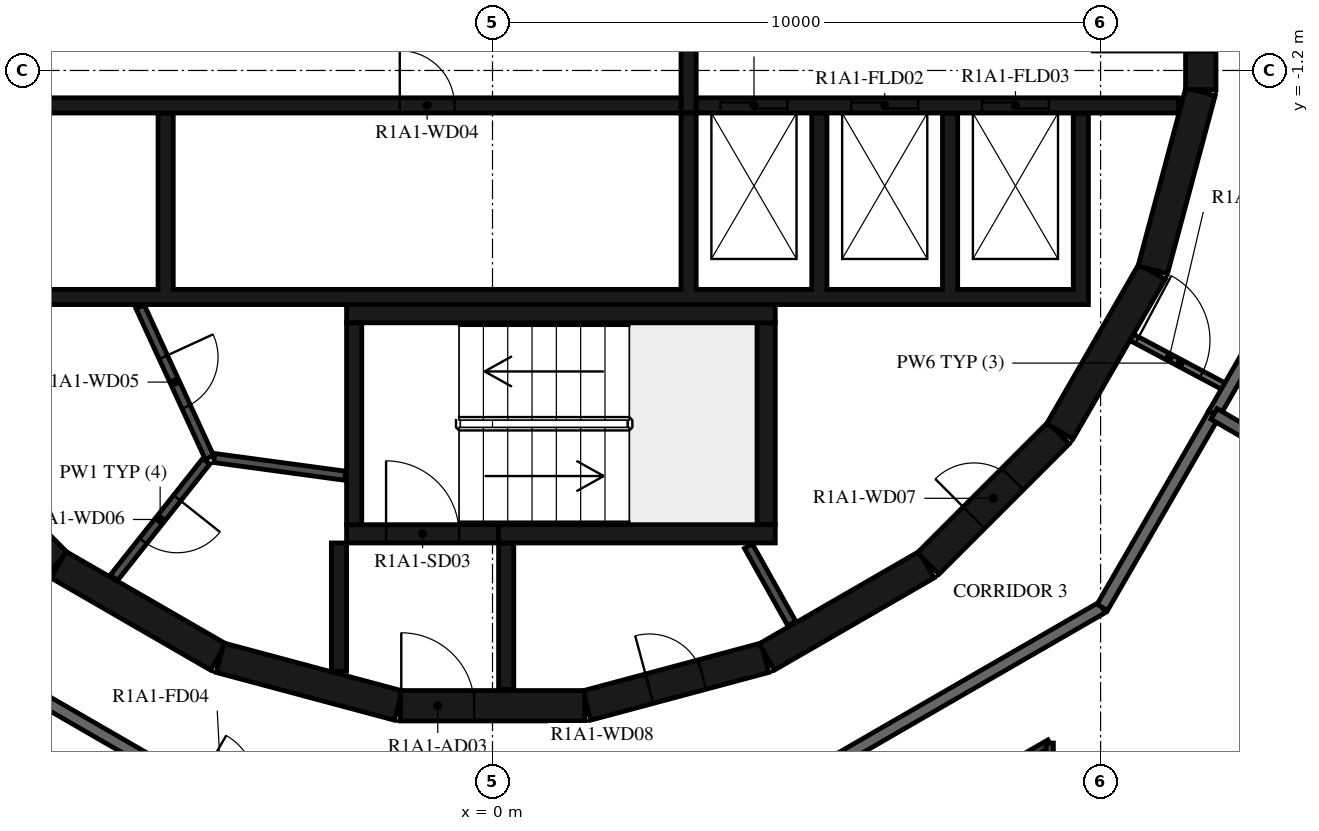
"""IFC4 building model, lengths in metres.
Left out: names, types, materials, properties, quantities, classifications, styles, units other than length and angle.
Written with IfcOpenShell. Run it as: python <this file> out.ifc"""

import sys

from ifc_helpers import new_model, si_unit, direction, frame, frame_2d, origin, place, context, subcontext, project, spatial, polyline, rectangle, outline, extrude, element, fill, save


model = new_model("IFC4")
c1 = context("Model", 3, precision=1e-05, world=origin(), true_north=direction((0.0, 1.0)))
c2 = subcontext(c1, "Body", "Model", "MODEL_VIEW")
j1 = project(units=[si_unit("LENGTHUNIT", "METRE"), si_unit("PLANEANGLEUNIT", "RADIAN")], contexts=[c1])
p1 = place(None, origin())
s1 = spatial("IfcSite", under=j1, at=p1, CompositionType="ELEMENT")
p2 = place(p1, origin())
s2 = spatial("IfcBuilding", under=s1, at=p2, CompositionType="ELEMENT")
p3 = place(p2, frame((0.0, 0.0, 41.9)))
s3 = spatial("IfcBuildingStorey", under=s2, at=p3, CompositionType="ELEMENT", Elevation=41.9)
p4 = place(p3, frame((1.55, -11.643, 0.0), z_axis=(0.0, 0.0, 1.0), x_axis=(0.965948410781, 0.258734743916, 0.0)))
e1 = element("IfcWall", 1, at=p4, inside=s3, PredefinedType="SHEAR", context=c2, shape_type="SweptSolid", body=[
    extrude(rectangle(XDim=3.033, YDim=0.5, at=frame_2d((1.516, 0.0))), origin(), (0.0, 0.0, 1.0), 3.12),
])
p5 = place(p4, frame((1.066, 0.0, 0.0)))
e2 = element("IfcOpeningElement", 2, at=p5, cuts=e1, PredefinedType="OPENING", context=c2, shape_type="SweptSolid", body=[
    extrude(rectangle(XDim=0.9, YDim=2.1, at=frame_2d((0.45, 1.05))), frame((0.0, 0.26, 0.0), z_axis=(0.0, -1.0, 0.0), x_axis=(1.0, 0.0, 0.0)), (0.0, 0.0, 1.0), 0.52),
])
p6 = place(p3, frame((4.51, -10.845, 0.0), z_axis=(0.0, 0.0, 1.0), x_axis=(0.865975092491, 0.500087131594, 0.0)))
e3 = element("IfcWall", 3, at=p6, inside=s3, PredefinedType="SHEAR", context=c2, shape_type="SweptSolid", body=[
    extrude(rectangle(XDim=3.033, YDim=0.5, at=frame_2d((1.516, 0.0))), origin(), (0.0, 0.0, 1.0), 3.12),
])
p7 = place(p3, frame((7.164, -9.308, 0.0), z_axis=(0.0, 0.0, 1.0), x_axis=(0.707106781187, 0.707106781187, 0.0)))
e4 = element("IfcWall", 4, at=p7, inside=s3, PredefinedType="SHEAR", context=c2, shape_type="SweptSolid", body=[
    extrude(rectangle(XDim=3.032, YDim=0.5, at=frame_2d((1.516, 0.0))), origin(), (0.0, 0.0, 1.0), 3.12),
])
p8 = place(p7, frame((1.066, 0.0, 0.0)))
e5 = element("IfcOpeningElement", 5, at=p8, cuts=e4, PredefinedType="OPENING", context=c2, shape_type="SweptSolid", body=[
    extrude(rectangle(XDim=0.9, YDim=2.1, at=frame_2d((0.45, 1.05))), frame((0.0, 0.26, 0.0), z_axis=(0.0, -1.0, 0.0), x_axis=(1.0, 0.0, 0.0)), (0.0, 0.0, 1.0), 0.52),
])
for number, where, z_axis, x_axis in (
    (6, (9.329, -7.137, 0.0), (0.0, 0.0, 1.0), (0.5, 0.866, 0.0)),
    (7, (10.858, -4.479, 0.0), (0.0, 0.0, 1.0), (0.259, 0.966, 0.0)),
):
    element("IfcWall", number, at=place(p3, frame(where, z_axis=z_axis, x_axis=x_axis)), inside=s3, PredefinedType="SHEAR", context=c2, shape_type="SweptSolid", body=[
        extrude(rectangle(XDim=3.033, YDim=0.5, at=frame_2d((1.516, 0.0))), origin(), (0.0, 0.0, 1.0), 3.12),
    ])
p9 = place(p3, frame((11.647, -1.516, 0.0), z_axis=(0.0, 0.0, 1.0), x_axis=(0.0, 1.0, 0.0)))
e8 = element("IfcWall", 8, at=p9, inside=s3, PredefinedType="SHEAR", context=c2, shape_type="SweptSolid", body=[
    extrude(rectangle(XDim=3.033, YDim=0.5, at=frame_2d((1.516, 0.0))), origin(), (0.0, 0.0, 1.0), 3.12),
])
p10 = place(p9, frame((0.616, 0.0, 0.0)))
e9 = element("IfcOpeningElement", 9, at=p10, cuts=e8, PredefinedType="OPENING", context=c2, shape_type="SweptSolid", body=[
    extrude(rectangle(XDim=1.8, YDim=2.1, at=frame_2d((0.9, 1.05))), frame((0.0, 0.26, 0.0), z_axis=(0.0, -1.0, 0.0), x_axis=(1.0, 0.0, 0.0)), (0.0, 0.0, 1.0), 0.52),
])
p11 = place(p3, frame((-9.308, -7.164, 0.0), z_axis=(0.0, 0.0, 1.0), x_axis=(0.707106781187, -0.707106781187, 0.0)))
e10 = element("IfcWall", 10, at=p11, inside=s3, PredefinedType="SHEAR", context=c2, shape_type="SweptSolid", body=[
    extrude(rectangle(XDim=3.032, YDim=0.5, at=frame_2d((1.516, 0.0))), origin(), (0.0, 0.0, 1.0), 3.12),
])
for number, where, z_axis, x_axis in (
    (11, (-7.137, -9.329, 0.0), (0.0, 0.0, 1.0), (0.866, -0.5, 0.0)),
    (12, (-4.479, -10.858, 0.0), (0.0, 0.0, 1.0), (0.966, -0.259, 0.0)),
):
    element("IfcWall", number, at=place(p3, frame(where, z_axis=z_axis, x_axis=x_axis)), inside=s3, PredefinedType="SHEAR", context=c2, shape_type="SweptSolid", body=[
        extrude(rectangle(XDim=3.033, YDim=0.5, at=frame_2d((1.516, 0.0))), origin(), (0.0, 0.0, 1.0), 3.12),
    ])
p12 = place(p3, frame((-1.516, -11.647, 0.0), z_axis=(0.0, 0.0, 1.0), x_axis=(1.0, 0.0, 0.0)))
e13 = element("IfcWall", 13, at=p12, inside=s3, PredefinedType="SHEAR", context=c2, shape_type="SweptSolid", body=[
    extrude(rectangle(XDim=3.033, YDim=0.5, at=frame_2d((1.516, 0.0))), origin(), (0.0, 0.0, 1.0), 3.12),
])
p13 = place(p12, frame((0.016, 0.0, 0.0)))
e14 = element("IfcOpeningElement", 14, at=p13, cuts=e13, PredefinedType="OPENING", context=c2, shape_type="SweptSolid", body=[
    extrude(rectangle(XDim=1.2, YDim=2.1, at=frame_2d((0.6, 1.05))), frame((0.0, 0.26, 0.0), z_axis=(0.0, -1.0, 0.0), x_axis=(1.0, 0.0, 0.0)), (0.0, 0.0, 1.0), 0.52),
])
p14 = place(p3, frame((-2.275, -8.67, 0.0), z_axis=(0.0, 0.0, 1.0), x_axis=(0.0, 1.0, 0.0)))
e15 = element("IfcWall", 15, at=p14, inside=s3, PredefinedType="SHEAR", context=c2, shape_type="SweptSolid", body=[
    extrude(rectangle(XDim=3.32, YDim=0.25, at=frame_2d((1.66, 0.0))), origin(), (0.0, 0.0, 1.0), 3.12),
])
p15 = place(p3, frame((-2.4, -5.2, 0.0), z_axis=(0.0, 0.0, 1.0), x_axis=(1.0, 0.0, 0.0)))
e16 = element("IfcWall", 16, at=p15, inside=s3, PredefinedType="SHEAR", context=c2, shape_type="SweptSolid", body=[
    extrude(rectangle(XDim=7.05, YDim=0.3, at=frame_2d((3.525, 0.0))), origin(), (0.0, 0.0, 1.0), 3.12),
])
p16 = place(p3, frame((4.5, -8.67, 0.0), z_axis=(0.0, 0.0, 1.0), x_axis=(0.0, 1.0, 0.0)))
e17 = element("IfcWall", 17, at=p16, inside=s3, PredefinedType="SHEAR", context=c2, shape_type="SweptSolid", body=[
    extrude(rectangle(XDim=3.32, YDim=0.3, at=frame_2d((1.66, 0.0))), origin(), (0.0, 0.0, 1.0), 3.12),
])
p17 = place(p3, frame((0.1, -8.82, 0.0), z_axis=(0.0, 0.0, 1.0), x_axis=(1.0, 0.0, 0.0)))
e18 = element("IfcWall", 18, at=p17, inside=s3, PredefinedType="SHEAR", context=c2, shape_type="SweptSolid", body=[
    extrude(rectangle(XDim=4.55, YDim=0.3, at=frame_2d((2.275, 0.0))), origin(), (0.0, 0.0, 1.0), 3.12),
])
p18 = place(p3, frame((-2.4, -8.82, 0.0), z_axis=(0.0, 0.0, 1.0), x_axis=(1.0, 0.0, 0.0)))
e19 = element("IfcWall", 19, at=p18, inside=s3, PredefinedType="SHEAR", context=c2, shape_type="SweptSolid", body=[
    extrude(rectangle(XDim=2.5, YDim=0.3, at=frame_2d((1.25, 0.0))), origin(), (0.0, 0.0, 1.0), 3.12),
])
p19 = place(p18, frame((0.65, 0.0, 0.0)))
e20 = element("IfcOpeningElement", 20, at=p19, cuts=e19, PredefinedType="OPENING", context=c2, shape_type="SweptSolid", body=[
    extrude(rectangle(XDim=1.2, YDim=2.1, at=frame_2d((0.6, 1.05))), frame((0.0, 0.16, 0.0), z_axis=(0.0, -1.0, 0.0), x_axis=(1.0, 0.0, 0.0)), (0.0, 0.0, 1.0), 0.32),
])
p20 = place(p3, frame((-2.525, -8.97, 0.0), z_axis=(0.0, 0.0, 1.0), x_axis=(0.0, -1.0, 0.0)))
e21 = element("IfcWall", 21, at=p20, inside=s3, PredefinedType="SHEAR", context=c2, shape_type="SweptSolid", body=[
    extrude(rectangle(XDim=2.11, YDim=0.25, at=frame_2d((1.055, 0.0))), origin(), (0.0, 0.0, 1.0), 3.12),
])
p21 = place(p3, frame((0.225, -8.97, 0.0), z_axis=(0.0, 0.0, 1.0), x_axis=(0.0, -1.0, 0.0)))
e22 = element("IfcWall", 22, at=p21, inside=s3, PredefinedType="SHEAR", context=c2, shape_type="SweptSolid", body=[
    extrude(rectangle(XDim=2.41, YDim=0.25, at=frame_2d((1.205, 0.0))), origin(), (0.0, 0.0, 1.0), 3.12),
])
p22 = place(p3, origin())
e23 = element("IfcWall", 23, at=p22, inside=s3, PredefinedType="SHEAR", context=c2, shape_type="SweptSolid", body=[
    extrude(outline(polyline([(9.8, -5.05), (9.8, -4.8), (9.8, -1.9), (9.55, -1.9), (9.55, -4.8), (7.65, -4.8), (7.65, -1.9), (7.4, -1.9), (7.4, -4.8), (5.5, -4.8), (5.5, -1.9), (5.25, -1.9), (5.25, -4.8), (3.35, -4.8), (3.35, -1.9), (3.1, -1.9), (3.1, -4.8), (-5.25, -4.8), (-5.25, -1.9), (-5.5, -1.9), (-5.5, -4.8), (-7.4, -4.8), (-7.4, -1.9), (-7.65, -1.9), (-7.65, -4.8), (-9.55, -4.8), (-9.55, -1.9), (-9.8, -1.9), (-9.8, -4.8), (-9.8, -5.05), (9.8, -5.05)])), origin(), (0.0, 0.0, 1.0), 3.12),
])
p23 = place(p3, frame((-11.28, -1.775, 0.0), z_axis=(0.0, 0.0, 1.0), x_axis=(1.0, 0.0, 0.0)))
e24 = element("IfcWall", 24, at=p23, inside=s3, PredefinedType="SHEAR", context=c2, shape_type="SweptSolid", body=[
    extrude(rectangle(XDim=14.38, YDim=0.25, at=frame_2d((7.19, 0.0))), origin(), (0.0, 0.0, 1.0), 3.12),
])
p24 = place(p23, frame((9.755, 0.0, 0.0)))
e25 = element("IfcOpeningElement", 25, at=p24, cuts=e24, PredefinedType="OPENING", context=c2, shape_type="SweptSolid", body=[
    extrude(rectangle(XDim=0.9, YDim=2.1, at=frame_2d((0.45, 1.05))), frame((0.0, 0.135, 0.0), z_axis=(0.0, -1.0, 0.0), x_axis=(1.0, 0.0, 0.0)), (0.0, 0.0, 1.0), 0.27),
])
p25 = place(p3, frame((3.35, -1.775, 0.0), z_axis=(0.0, 0.0, 1.0), x_axis=(1.0, 0.0, 0.0)))
e26 = element("IfcWall", 26, at=p25, inside=s3, PredefinedType="SHEAR", context=c2, shape_type="SweptSolid", body=[
    extrude(rectangle(XDim=7.93, YDim=0.25, at=frame_2d((3.965, 0.0))), origin(), (0.0, 0.0, 1.0), 3.12),
])
p26 = place(p25, frame((0.4, 0.0, 0.0)))
e27 = element("IfcOpeningElement", 27, at=p26, cuts=e26, PredefinedType="OPENING", context=c2, shape_type="SweptSolid", body=[
    extrude(rectangle(XDim=1.1, YDim=2.4, at=frame_2d((0.55, 1.2))), frame((0.0, 0.135, 0.0), z_axis=(0.0, -1.0, 0.0), x_axis=(1.0, 0.0, 0.0)), (0.0, 0.0, 1.0), 0.27),
])
p27 = place(p25, frame((2.55, 0.0, 0.0)))
e28 = element("IfcOpeningElement", 28, at=p27, cuts=e26, PredefinedType="OPENING", context=c2, shape_type="SweptSolid", body=[
    extrude(rectangle(XDim=1.1, YDim=2.4, at=frame_2d((0.55, 1.2))), frame((0.0, 0.135, 0.0), z_axis=(0.0, -1.0, 0.0), x_axis=(1.0, 0.0, 0.0)), (0.0, 0.0, 1.0), 0.27),
])
p28 = place(p25, frame((4.7, 0.0, 0.0)))
e29 = element("IfcOpeningElement", 29, at=p28, cuts=e26, PredefinedType="OPENING", context=c2, shape_type="SweptSolid", body=[
    extrude(rectangle(XDim=1.1, YDim=2.4, at=frame_2d((0.55, 1.2))), frame((0.0, 0.135, 0.0), z_axis=(0.0, -1.0, 0.0), x_axis=(1.0, 0.0, 0.0)), (0.0, 0.0, 1.0), 0.27),
])
p29 = place(p3, frame((3.225, -1.9, 0.0), z_axis=(0.0, 0.0, 1.0), x_axis=(0.0, 1.0, 0.0)))
e30 = element("IfcWall", 30, at=p29, inside=s3, PredefinedType="SHEAR", context=c2, shape_type="SweptSolid", body=[
    extrude(rectangle(XDim=3.8, YDim=0.25, at=frame_2d((1.9, 0.0))), origin(), (0.0, 0.0, 1.0), 3.12),
])
p30 = place(p3, frame((4.922, -10.296, 0.0), z_axis=(0.0, 0.0, 1.0), x_axis=(-0.48860846254, 0.872503163509, 0.0)))
e31 = element("IfcWall", 31, at=p30, inside=s3, PredefinedType="PARTITIONING", context=c2, shape_type="SweptSolid", body=[
    extrude(rectangle(XDim=1.459, YDim=0.15, at=frame_2d((0.73, 0.0))), origin(), (0.0, 0.0, 1.0), 3.12),
])
p31 = place(p3, frame((-5.795, -5.086, 0.0), z_axis=(0.0, 0.0, 1.0), x_axis=(0.417887867606, -0.908498613157, 0.0)))
e32 = element("IfcWall", 32, at=p31, inside=s3, PredefinedType="PARTITIONING", context=c2, shape_type="SweptSolid", body=[
    extrude(rectangle(XDim=2.726, YDim=0.15, at=frame_2d((1.363, 0.0))), origin(), (0.0, 0.0, 1.0), 3.12),
])
p32 = place(p31, frame((0.913, 0.0, 0.0)))
e33 = element("IfcOpeningElement", 33, at=p32, cuts=e32, PredefinedType="OPENING", context=c2, shape_type="SweptSolid", body=[
    extrude(rectangle(XDim=0.9, YDim=2.1, at=frame_2d((0.45, 1.05))), frame((0.0, 0.085, 0.0), z_axis=(0.0, -1.0, 0.0), x_axis=(1.0, 0.0, 0.0)), (0.0, 0.0, 1.0), 0.17),
])
p33 = place(p3, frame((-4.706, -7.625, 0.0), z_axis=(0.0, 0.0, 1.0), x_axis=(-0.621392599334, -0.783499353856, 0.0)))
e34 = element("IfcWall", 34, at=p33, inside=s3, PredefinedType="PARTITIONING", context=c2, shape_type="SweptSolid", body=[
    extrude(rectangle(XDim=2.447, YDim=0.15, at=frame_2d((1.224, 0.0))), origin(), (0.0, 0.0, 1.0), 3.12),
])
p34 = place(p33, frame((0.774, 0.0, 0.0)))
e35 = element("IfcOpeningElement", 35, at=p34, cuts=e34, PredefinedType="OPENING", context=c2, shape_type="SweptSolid", body=[
    extrude(rectangle(XDim=0.9, YDim=2.1, at=frame_2d((0.45, 1.05))), frame((0.0, 0.085, 0.0), z_axis=(0.0, -1.0, 0.0), x_axis=(1.0, 0.0, 0.0)), (0.0, 0.0, 1.0), 0.17),
])
p35 = place(p3, frame((-2.42, -7.865, 0.0), z_axis=(0.0, 0.0, 1.0), x_axis=(-0.990972299108, 0.134066783362, 0.0)))
e36 = element("IfcWall", 36, at=p35, inside=s3, PredefinedType="PARTITIONING", context=c2, shape_type="SweptSolid", body=[
    extrude(rectangle(XDim=2.176, YDim=0.15, at=frame_2d((1.088, 0.0))), origin(), (0.0, 0.0, 1.0), 3.12),
])
p36 = place(p3, frame((10.511, -5.589, 0.0), z_axis=(0.0, 0.0, 1.0), x_axis=(0.88294043061, -0.469485032769, 0.0)))
e37 = element("IfcWall", 37, at=p36, inside=s3, PredefinedType="PARTITIONING", context=c2, shape_type="SweptSolid", body=[
    extrude(rectangle(XDim=1.804, YDim=0.12, at=frame_2d((0.902, 0.0))), origin(), (0.0, 0.0, 1.0), 3.12),
])
p37 = place(p36, frame((0.1, 0.0, 0.0)))
e38 = element("IfcOpeningElement", 38, at=p37, cuts=e37, PredefinedType="OPENING", context=c2, shape_type="SweptSolid", body=[
    extrude(rectangle(XDim=1.2, YDim=2.1, at=frame_2d((0.6, 1.05))), frame((0.0, 0.07, 0.0), z_axis=(0.0, -1.0, 0.0), x_axis=(1.0, 0.0, 0.0)), (0.0, 0.0, 1.0), 0.14),
])
p38 = place(p3, frame((11.865, -6.849, 0.0), z_axis=(0.0, 0.0, 1.0), x_axis=(0.500002704028, 0.866023842607, 0.0)))
e39 = element("IfcWall", 39, at=p38, inside=s3, PredefinedType="STANDARD", context=c2, shape_type="SweptSolid", body=[
    extrude(rectangle(XDim=3.67, YDim=0.2, at=frame_2d((1.835, 0.0))), origin(), (0.0, 0.0, 1.0), 3.12),
])
p39 = place(p3, frame((-10.029, -10.029, 0.0), z_axis=(0.0, 0.0, 1.0), x_axis=(0.866022878987, -0.500004373052, 0.0)))
e40 = element("IfcWall", 40, at=p39, inside=s3, PredefinedType="STANDARD", context=c2, shape_type="SweptSolid", body=[
    extrude(rectangle(XDim=7.146, YDim=0.2, at=frame_2d((3.573, 0.0))), origin(), (0.0, 0.0, 1.0), 3.12),
])
p40 = place(p39, frame((5.947, 0.0, 0.0)))
e41 = element("IfcOpeningElement", 41, at=p40, cuts=e40, PredefinedType="OPENING", context=c2, shape_type="SweptSolid", body=[
    extrude(rectangle(XDim=1.0, YDim=2.1, at=frame_2d((0.5, 1.05))), frame((0.0, 0.11, 0.0), z_axis=(0.0, -1.0, 0.0), x_axis=(1.0, 0.0, 0.0)), (0.0, 0.0, 1.0), 0.22),
])
p41 = place(p3, frame((3.671, -13.7, 0.0), z_axis=(0.0, 0.0, 1.0), x_axis=(0.866024439905, 0.500001669485, 0.0)))
e42 = element("IfcWall", 42, at=p41, inside=s3, PredefinedType="STANDARD", context=c2, shape_type="SweptSolid", body=[
    extrude(rectangle(XDim=7.342, YDim=0.2, at=frame_2d((3.671, 0.0))), origin(), (0.0, 0.0, 1.0), 3.12),
])
p42 = place(p3, frame((10.029, -10.029, 0.0), z_axis=(0.0, 0.0, 1.0), x_axis=(0.50001606911, 0.866016126081, 0.0)))
e43 = element("IfcWall", 43, at=p42, inside=s3, PredefinedType="STANDARD", context=c2, shape_type="SweptSolid", body=[
    extrude(rectangle(XDim=3.671, YDim=0.2, at=frame_2d((1.835, 0.0))), origin(), (0.0, 0.0, 1.0), 3.12),
])
p43 = place(p3, frame((18.694, -10.793, 0.0), z_axis=(0.0, 0.0, 1.0), x_axis=(-0.865964895271, 0.500104789178, 0.0)))
e44 = element("IfcWall", 44, at=p43, inside=s3, PredefinedType="STANDARD", context=c2, shape_type="SweptSolid", body=[
    extrude(rectangle(XDim=7.885, YDim=0.2, at=frame_2d((3.943, 0.0))), origin(), (0.0, 0.0, 1.0), 3.12),
])
p44 = place(p3, frame((-11.127, -11.127, 0.0), z_axis=(0.0, 0.0, 1.0), x_axis=(0.866032360344, -0.499987950692, 0.0)))
e45 = element("IfcWall", 45, at=p44, inside=s3, PredefinedType="PARTITIONING", context=c2, shape_type="SweptSolid", body=[
    extrude(rectangle(XDim=8.146, YDim=0.12, at=frame_2d((4.073, 0.0))), origin(), (0.0, 0.0, 1.0), 3.12),
])
p45 = place(p44, frame((1.357, 0.0, 0.0)))
e46 = element("IfcOpeningElement", 46, at=p45, cuts=e45, PredefinedType="OPENING", context=c2, shape_type="SweptSolid", body=[
    extrude(rectangle(XDim=0.8, YDim=2.1, at=frame_2d((0.4, 1.05))), frame((0.0, 0.07, 0.0), z_axis=(0.0, -1.0, 0.0), x_axis=(1.0, 0.0, 0.0)), (0.0, 0.0, 1.0), 0.14),
])
p46 = place(p3, frame((4.073, -15.2, 0.0), z_axis=(0.0, 0.0, 1.0), x_axis=(0.866034128446, 0.499984888139, 0.0)))
e47 = element("IfcWall", 47, at=p46, inside=s3, PredefinedType="PARTITIONING", context=c2, shape_type="SweptSolid", body=[
    extrude(rectangle(XDim=5.879, YDim=0.12, at=frame_2d((2.939, 0.0))), origin(), (0.0, 0.0, 1.0), 3.12),
])
p47 = place(p46, frame((1.4, 0.0, 0.0)))
e48 = element("IfcOpeningElement", 48, at=p47, cuts=e47, PredefinedType="OPENING", context=c2, shape_type="SweptSolid", body=[
    extrude(rectangle(XDim=0.8, YDim=2.1, at=frame_2d((0.4, 1.05))), frame((0.0, 0.07, 0.0), z_axis=(0.0, -1.0, 0.0), x_axis=(1.0, 0.0, 0.0)), (0.0, 0.0, 1.0), 0.14),
])
p48 = place(p3, frame((9.164, -12.261, 0.0), z_axis=(0.0, 0.0, 1.0), x_axis=(0.0, -1.0, 0.0)))
e49 = element("IfcWall", 49, at=p48, inside=s3, PredefinedType="PARTITIONING", context=c2, shape_type="SweptSolid", body=[
    extrude(rectangle(XDim=2.969, YDim=0.12, at=frame_2d((1.485, 0.0))), origin(), (0.0, 0.0, 1.0), 3.12),
])
p49 = place(p19, origin())
e50 = element("IfcDoor", 50, at=p49, inside=s3, OperationType="SINGLE_SWING_LEFT", PredefinedType="DOOR", context=c2, shape_type="SweptSolid", body=[
    extrude(rectangle(XDim=1.2, YDim=2.1, at=frame_2d((0.6, 1.05))), frame((0.0, 0.025, 0.0), z_axis=(0.0, -1.0, 0.0), x_axis=(1.0, 0.0, 0.0)), (0.0, 0.0, 1.0), 0.05),
])
fill(e20, e50)
p50 = place(p13, origin())
e51 = element("IfcDoor", 51, at=p50, inside=s3, OperationType="SINGLE_SWING_RIGHT", PredefinedType="DOOR", context=c2, shape_type="SweptSolid", body=[
    extrude(rectangle(XDim=1.2, YDim=2.1, at=frame_2d((0.6, 1.05))), frame((0.0, 0.025, 0.0), z_axis=(0.0, -1.0, 0.0), x_axis=(1.0, 0.0, 0.0)), (0.0, 0.0, 1.0), 0.05),
])
fill(e14, e51)
p51 = place(p10, origin())
e52 = element("IfcDoor", 52, at=p51, inside=s3, OperationType="DOUBLE_DOOR_SINGLE_SWING", PredefinedType="DOOR", context=c2, shape_type="SweptSolid", body=[
    extrude(rectangle(XDim=1.8, YDim=2.1, at=frame_2d((0.9, 1.05))), frame((0.0, 0.025, 0.0), z_axis=(0.0, -1.0, 0.0), x_axis=(1.0, 0.0, 0.0)), (0.0, 0.0, 1.0), 0.05),
])
fill(e9, e52)
p52 = place(p26, origin())
e53 = element("IfcDoor", 53, at=p52, inside=s3, OperationType="DOUBLE_DOOR_SLIDING", PredefinedType="DOOR", context=c2, shape_type="SweptSolid", body=[
    extrude(rectangle(XDim=1.1, YDim=2.4, at=frame_2d((0.55, 1.2))), frame((0.0, 0.025, 0.0), z_axis=(0.0, -1.0, 0.0), x_axis=(1.0, 0.0, 0.0)), (0.0, 0.0, 1.0), 0.05),
])
fill(e27, e53)
p53 = place(p27, origin())
e54 = element("IfcDoor", 54, at=p53, inside=s3, OperationType="DOUBLE_DOOR_SLIDING", PredefinedType="DOOR", context=c2, shape_type="SweptSolid", body=[
    extrude(rectangle(XDim=1.1, YDim=2.4, at=frame_2d((0.55, 1.2))), frame((0.0, 0.025, 0.0), z_axis=(0.0, -1.0, 0.0), x_axis=(1.0, 0.0, 0.0)), (0.0, 0.0, 1.0), 0.05),
])
fill(e28, e54)
p54 = place(p28, origin())
e55 = element("IfcDoor", 55, at=p54, inside=s3, OperationType="DOUBLE_DOOR_SLIDING", PredefinedType="DOOR", context=c2, shape_type="SweptSolid", body=[
    extrude(rectangle(XDim=1.1, YDim=2.4, at=frame_2d((0.55, 1.2))), frame((0.0, 0.025, 0.0), z_axis=(0.0, -1.0, 0.0), x_axis=(1.0, 0.0, 0.0)), (0.0, 0.0, 1.0), 0.05),
])
fill(e29, e55)
p55 = place(p24, origin())
e56 = element("IfcDoor", 56, at=p55, inside=s3, OperationType="SINGLE_SWING_LEFT", PredefinedType="DOOR", context=c2, shape_type="SweptSolid", body=[
    extrude(rectangle(XDim=0.9, YDim=2.1, at=frame_2d((0.45, 1.05))), frame((0.0, 0.025, 0.0), z_axis=(0.0, -1.0, 0.0), x_axis=(1.0, 0.0, 0.0)), (0.0, 0.0, 1.0), 0.05),
])
fill(e25, e56)
p56 = place(p32, origin())
e57 = element("IfcDoor", 57, at=p56, inside=s3, OperationType="SINGLE_SWING_RIGHT", PredefinedType="DOOR", context=c2, shape_type="SweptSolid", body=[
    extrude(rectangle(XDim=0.9, YDim=2.1, at=frame_2d((0.45, 1.05))), frame((0.0, 0.025, 0.0), z_axis=(0.0, -1.0, 0.0), x_axis=(1.0, 0.0, 0.0)), (0.0, 0.0, 1.0), 0.05),
])
fill(e33, e57)
p57 = place(p34, origin())
e58 = element("IfcDoor", 58, at=p57, inside=s3, OperationType="SINGLE_SWING_LEFT", PredefinedType="DOOR", context=c2, shape_type="SweptSolid", body=[
    extrude(rectangle(XDim=0.9, YDim=2.1, at=frame_2d((0.45, 1.05))), frame((0.0, 0.025, 0.0), z_axis=(0.0, -1.0, 0.0), x_axis=(1.0, 0.0, 0.0)), (0.0, 0.0, 1.0), 0.05),
])
fill(e35, e58)
p58 = place(p8, origin())
e59 = element("IfcDoor", 59, at=p58, inside=s3, OperationType="SINGLE_SWING_RIGHT", PredefinedType="DOOR", context=c2, shape_type="SweptSolid", body=[
    extrude(rectangle(XDim=0.9, YDim=2.1, at=frame_2d((0.45, 1.05))), frame((0.0, 0.025, 0.0), z_axis=(0.0, -1.0, 0.0), x_axis=(1.0, 0.0, 0.0)), (0.0, 0.0, 1.0), 0.05),
])
fill(e5, e59)
p59 = place(p5, origin())
e60 = element("IfcDoor", 60, at=p59, inside=s3, OperationType="SINGLE_SWING_LEFT", PredefinedType="DOOR", context=c2, shape_type="SweptSolid", body=[
    extrude(rectangle(XDim=0.9, YDim=2.1, at=frame_2d((0.45, 1.05))), frame((0.0, 0.025, 0.0), z_axis=(0.0, -1.0, 0.0), x_axis=(1.0, 0.0, 0.0)), (0.0, 0.0, 1.0), 0.05),
])
fill(e2, e60)
p60 = place(p37, origin())
e61 = element("IfcDoor", 61, at=p60, inside=s3, OperationType="DOUBLE_DOOR_SINGLE_SWING", PredefinedType="DOOR", context=c2, shape_type="SweptSolid", body=[
    extrude(rectangle(XDim=1.2, YDim=2.1, at=frame_2d((0.6, 1.05))), frame((0.0, 0.025, 0.0), z_axis=(0.0, -1.0, 0.0), x_axis=(1.0, 0.0, 0.0)), (0.0, 0.0, 1.0), 0.05),
])
fill(e38, e61)
save(model, sys.argv[1])
